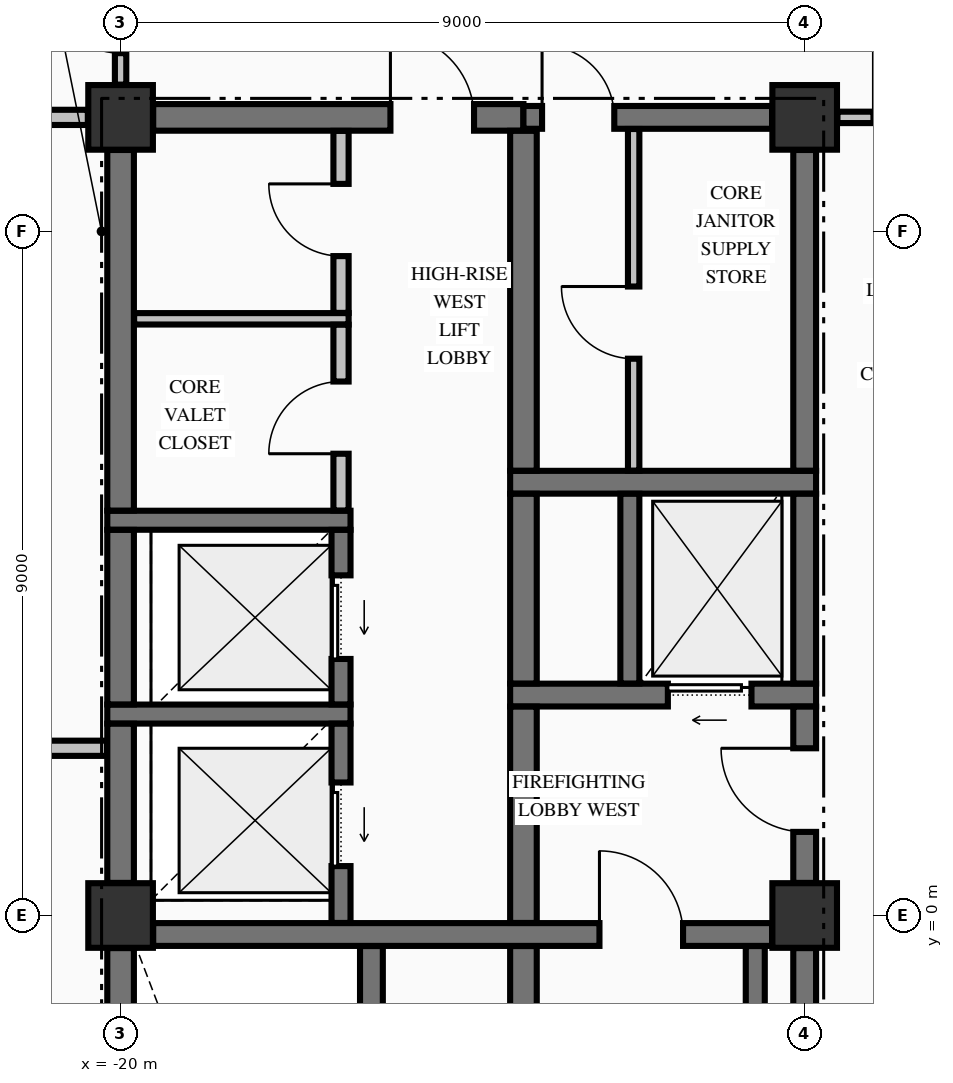
"""IFC4 building model, lengths in metres.
Left out: names, types, materials, properties, quantities, classifications, styles, units other than length and angle.
Written with IfcOpenShell. Run it as: python <this file> out.ifc"""

import sys

from ifc_helpers import new_model, si_unit, direction, frame, frame_2d, origin, origin_2d, place, context, subcontext, project, spatial, rectangle, extrude, element, fill, save


model = new_model("IFC4")
c1 = context("Model", 3, precision=1e-05, world=origin(), true_north=direction((0.0, 1.0)))
c2 = subcontext(c1, "Body", "Model", "MODEL_VIEW")
j1 = project(units=[si_unit("LENGTHUNIT", "METRE"), si_unit("PLANEANGLEUNIT", "RADIAN")], contexts=[c1])
p1 = place(None, origin())
s1 = spatial("IfcSite", under=j1, at=p1, CompositionType="ELEMENT")
p2 = place(p1, origin())
s2 = spatial("IfcBuilding", under=s1, at=p2, CompositionType="ELEMENT")
p3 = place(p2, frame((0.0, 0.0, 211.86)))
s3 = spatial("IfcBuildingStorey", under=s2, at=p3, CompositionType="ELEMENT", Elevation=211.86)
for number, where, z_axis, x_axis in (
    (1, (-20.0, 10.5, -0.325), (0.0, 0.0, 1.0), (1.0, 0.0, 0.0)),
    (2, (-11.0, 0.0, -0.325), (0.0, 0.0, 1.0), (1.0, 0.0, 0.0)),
    (3, (-11.0, 10.5, -0.325), (0.0, 0.0, 1.0), (1.0, 0.0, 0.0)),
    (4, (-20.0, 0.0, -0.325), (0.0, 0.0, 1.0), (1.0, 0.0, 0.0)),
):
    element("IfcColumn", number, at=place(p3, frame(where, z_axis=z_axis, x_axis=x_axis)), inside=s3, PredefinedType="COLUMN", context=c2, shape_type="SweptSolid", body=[
        extrude(rectangle(XDim=0.85, YDim=0.85, at=origin_2d()), origin(), (0.0, 0.0, 1.0), 3.475),
    ])
p4 = place(p3, frame((-19.571, -0.25, 0.0), z_axis=(0.0, 0.0, 1.0), x_axis=(1.0, 0.0, 0.0)))
e5 = element("IfcWall", 5, at=p4, inside=s3, PredefinedType="SHEAR", context=c2, shape_type="SweptSolid", body=[
    extrude(rectangle(XDim=8.142, YDim=0.3, at=frame_2d((4.071, 0.0))), origin(), (0.0, 0.0, 1.0), 3.15),
])
p5 = place(p4, frame((5.871, 0.0, 0.0)))
e6 = element("IfcOpeningElement", 6, at=p5, cuts=e5, PredefinedType="OPENING", context=c2, shape_type="SweptSolid", body=[
    extrude(rectangle(XDim=1.1, YDim=2.15, at=frame_2d((0.55, 1.075))), frame((0.0, 0.16, 0.0), z_axis=(0.0, -1.0, 0.0), x_axis=(1.0, 0.0, 0.0)), (0.0, 0.0, 1.0), 0.32),
])
p6 = place(p3, frame((-20.175, 2.65, 0.0), z_axis=(0.0, 0.0, 1.0), x_axis=(1.0, 0.0, 0.0)))
e7 = element("IfcWall", 7, at=p6, inside=s3, PredefinedType="SOLIDWALL", context=c2, shape_type="SweptSolid", body=[
    extrude(rectangle(XDim=3.2, YDim=0.25, at=frame_2d((1.6, 0.0))), origin(), (0.0, 0.0, 1.0), 3.15),
])
p7 = place(p3, frame((-14.875, 2.9, 0.0), z_axis=(0.0, 0.0, 1.0), x_axis=(1.0, 0.0, 0.0)))
e8 = element("IfcWall", 8, at=p7, inside=s3, PredefinedType="SHEAR", context=c2, shape_type="SweptSolid", body=[
    extrude(rectangle(XDim=4.025, YDim=0.3, at=frame_2d((2.012, 0.0))), origin(), (0.0, 0.0, 1.0), 3.15),
])
p8 = place(p7, frame((2.075, 0.0, 0.0)))
e9 = element("IfcOpeningElement", 9, at=p8, cuts=e8, PredefinedType="OPENING", context=c2, shape_type="SweptSolid", body=[
    extrude(rectangle(XDim=1.1, YDim=2.2, at=frame_2d((0.55, 1.1))), frame((0.0, 0.16, 0.0), z_axis=(0.0, -1.0, 0.0), x_axis=(1.0, 0.0, 0.0)), (0.0, 0.0, 1.0), 0.32),
])
p9 = place(p3, frame((-20.175, 5.2, 0.0), z_axis=(0.0, 0.0, 1.0), x_axis=(1.0, 0.0, 0.0)))
e10 = element("IfcWall", 10, at=p9, inside=s3, PredefinedType="SOLIDWALL", context=c2, shape_type="SweptSolid", body=[
    extrude(rectangle(XDim=3.2, YDim=0.25, at=frame_2d((1.6, 0.0))), origin(), (0.0, 0.0, 1.0), 3.15),
])
p10 = place(p3, frame((-14.875, 5.7, 0.0), z_axis=(0.0, 0.0, 1.0), x_axis=(1.0, 0.0, 0.0)))
e11 = element("IfcWall", 11, at=p10, inside=s3, PredefinedType="SHEAR", context=c2, shape_type="SweptSolid", body=[
    extrude(rectangle(XDim=4.025, YDim=0.3, at=frame_2d((2.012, 0.0))), origin(), (0.0, 0.0, 1.0), 3.15),
])
p11 = place(p3, frame((-19.571, 10.5, 0.0), z_axis=(0.0, 0.0, 1.0), x_axis=(1.0, 0.0, 0.0)))
e12 = element("IfcWall", 12, at=p11, inside=s3, PredefinedType="SHEAR", context=c2, shape_type="SweptSolid", body=[
    extrude(rectangle(XDim=4.871, YDim=0.35, at=frame_2d((2.436, 0.0))), origin(), (0.0, 0.0, 1.0), 3.15),
])
p12 = place(p11, frame((3.121, 0.0, 0.0)))
e13 = element("IfcOpeningElement", 13, at=p12, cuts=e12, PredefinedType="OPENING", context=c2, shape_type="SweptSolid", body=[
    extrude(rectangle(XDim=1.1, YDim=2.15, at=frame_2d((0.55, 1.075))), frame((0.0, 0.185, 0.0), z_axis=(0.0, -1.0, 0.0), x_axis=(1.0, 0.0, 0.0)), (0.0, 0.0, 1.0), 0.37),
])
p13 = place(p3, frame((-14.7, 10.5, 0.0), z_axis=(0.0, 0.0, 1.0), x_axis=(1.0, 0.0, 0.0)))
e14 = element("IfcWall", 14, at=p13, inside=s3, PredefinedType="SHEAR", context=c2, shape_type="SweptSolid", body=[
    extrude(rectangle(XDim=3.271, YDim=0.3, at=frame_2d((1.635, 0.0))), origin(), (0.0, 0.0, 1.0), 3.15),
])
p14 = place(p13, frame((0.245, 0.0, 0.0)))
e15 = element("IfcOpeningElement", 15, at=p14, cuts=e14, PredefinedType="OPENING", context=c2, shape_type="SweptSolid", body=[
    extrude(rectangle(XDim=0.95, YDim=2.15, at=frame_2d((0.475, 1.075))), frame((0.0, 0.16, 0.0), z_axis=(0.0, -1.0, 0.0), x_axis=(1.0, 0.0, 0.0)), (0.0, 0.0, 1.0), 0.32),
])
p15 = place(p3, frame((-26.835, 2.2, 0.0), z_axis=(0.0, 0.0, 1.0), x_axis=(1.0, 0.0, 0.0)))
e16 = element("IfcWall", 16, at=p15, inside=s3, PredefinedType="PARTITIONING", context=c2, shape_type="SweptSolid", body=[
    extrude(rectangle(XDim=6.657, YDim=0.2, at=frame_2d((3.329, 0.0))), origin(), (0.0, 0.0, 1.0), 3.15),
])
p16 = place(p3, frame((-19.822, 7.85, 0.0), z_axis=(0.0, 0.0, 1.0), x_axis=(1.0, 0.0, 0.0)))
e17 = element("IfcWall", 17, at=p16, inside=s3, PredefinedType="PARTITIONING", context=c2, shape_type="SweptSolid", body=[
    extrude(rectangle(XDim=2.822, YDim=0.15, at=frame_2d((1.411, 0.0))), origin(), (0.0, 0.0, 1.0), 3.15),
])
p17 = place(p3, frame((-26.835, 10.5, 0.0), z_axis=(0.0, 0.0, 1.0), x_axis=(1.0, 0.0, 0.0)))
e18 = element("IfcWall", 18, at=p17, inside=s3, PredefinedType="PARTITIONING", context=c2, shape_type="SweptSolid", body=[
    extrude(rectangle(XDim=6.404, YDim=0.2, at=frame_2d((3.202, 0.0))), origin(), (0.0, 0.0, 1.0), 3.15),
])
p18 = place(p17, frame((2.86, 0.0, 0.0)))
e19 = element("IfcOpeningElement", 19, at=p18, cuts=e18, PredefinedType="OPENING", context=c2, shape_type="SweptSolid", body=[
    extrude(rectangle(XDim=0.95, YDim=2.15, at=frame_2d((0.475, 1.075))), frame((0.0, 0.11, 0.0), z_axis=(0.0, -1.0, 0.0), x_axis=(1.0, 0.0, 0.0)), (0.0, 0.0, 1.0), 0.22),
])
p19 = place(p3, frame((-10.569, 10.5, 0.0), z_axis=(0.0, 0.0, 1.0), x_axis=(1.0, 0.0, 0.0)))
e20 = element("IfcWall", 20, at=p19, inside=s3, PredefinedType="PARTITIONING", context=c2, shape_type="SweptSolid", body=[
    extrude(rectangle(XDim=21.138, YDim=0.15, at=frame_2d((10.569, 0.0))), origin(), (0.0, 0.0, 1.0), 3.15),
])
p20 = place(p19, frame((0.474, 0.0, 0.0)))
e21 = element("IfcOpeningElement", 21, at=p20, cuts=e20, PredefinedType="OPENING", context=c2, shape_type="SweptSolid", body=[
    extrude(rectangle(XDim=1.05, YDim=2.15, at=frame_2d((0.525, 1.075))), frame((0.0, 0.085, 0.0), z_axis=(0.0, -1.0, 0.0), x_axis=(1.0, 0.0, 0.0)), (0.0, 0.0, 1.0), 0.17),
])
p21 = place(p19, frame((19.614, 0.0, 0.0)))
e22 = element("IfcOpeningElement", 22, at=p21, cuts=e20, PredefinedType="OPENING", context=c2, shape_type="SweptSolid", body=[
    extrude(rectangle(XDim=1.05, YDim=2.15, at=frame_2d((0.525, 1.075))), frame((0.0, 0.085, 0.0), z_axis=(0.0, -1.0, 0.0), x_axis=(1.0, 0.0, 0.0)), (0.0, 0.0, 1.0), 0.17),
])
p22 = place(p3, frame((-20.0, -9.521, 0.0), z_axis=(0.0, 0.0, 1.0), x_axis=(0.0, 1.0, 0.0)))
e23 = element("IfcWall", 23, at=p22, inside=s3, PredefinedType="SHEAR", context=c2, shape_type="SweptSolid", body=[
    extrude(rectangle(XDim=9.092, YDim=0.35, at=frame_2d((4.546, 0.0))), origin(), (0.0, 0.0, 1.0), 3.15),
])
p23 = place(p3, frame((-20.0, 0.429, 0.0), z_axis=(0.0, 0.0, 1.0), x_axis=(0.0, 1.0, 0.0)))
e24 = element("IfcWall", 24, at=p23, inside=s3, PredefinedType="SHEAR", context=c2, shape_type="SweptSolid", body=[
    extrude(rectangle(XDim=2.094, YDim=0.35, at=frame_2d((1.047, 0.0))), origin(), (0.0, 0.0, 1.0), 3.15),
])
p24 = place(p3, frame((-20.0, 2.777, 0.0), z_axis=(0.0, 0.0, 1.0), x_axis=(0.0, 1.0, 0.0)))
e25 = element("IfcWall", 25, at=p24, inside=s3, PredefinedType="SHEAR", context=c2, shape_type="SweptSolid", body=[
    extrude(rectangle(XDim=2.296, YDim=0.35, at=frame_2d((1.148, 0.0))), origin(), (0.0, 0.0, 1.0), 3.15),
])
p25 = place(p3, frame((-20.0, 5.327, 0.0), z_axis=(0.0, 0.0, 1.0), x_axis=(0.0, 1.0, 0.0)))
e26 = element("IfcWall", 26, at=p25, inside=s3, PredefinedType="SHEAR", context=c2, shape_type="SweptSolid", body=[
    extrude(rectangle(XDim=4.744, YDim=0.35, at=frame_2d((2.372, 0.0))), origin(), (0.0, 0.0, 1.0), 3.15),
])
p26 = place(p3, frame((-17.1, -0.098, 0.0), z_axis=(0.0, 0.0, 1.0), x_axis=(0.0, 1.0, 0.0)))
e27 = element("IfcWall", 27, at=p26, inside=s3, PredefinedType="SOLIDWALL", context=c2, shape_type="SweptSolid", body=[
    extrude(rectangle(XDim=2.621, YDim=0.25, at=frame_2d((1.311, 0.0))), origin(), (0.0, 0.0, 1.0), 3.15),
])
p27 = place(p26, frame((0.748, 0.0, 0.0)))
e28 = element("IfcOpeningElement", 28, at=p27, cuts=e27, PredefinedType="OPENING", context=c2, shape_type="SweptSolid", body=[
    extrude(rectangle(XDim=1.1, YDim=2.2, at=frame_2d((0.55, 1.1))), frame((0.0, 0.135, 0.0), z_axis=(0.0, -1.0, 0.0), x_axis=(1.0, 0.0, 0.0)), (0.0, 0.0, 1.0), 0.27),
])
p28 = place(p3, frame((-17.1, 2.777, 0.0), z_axis=(0.0, 0.0, 1.0), x_axis=(0.0, 1.0, 0.0)))
e29 = element("IfcWall", 29, at=p28, inside=s3, PredefinedType="SOLIDWALL", context=c2, shape_type="SweptSolid", body=[
    extrude(rectangle(XDim=2.296, YDim=0.25, at=frame_2d((1.148, 0.0))), origin(), (0.0, 0.0, 1.0), 3.15),
])
p29 = place(p28, frame((0.598, 0.0, 0.0)))
e30 = element("IfcOpeningElement", 30, at=p29, cuts=e29, PredefinedType="OPENING", context=c2, shape_type="SweptSolid", body=[
    extrude(rectangle(XDim=1.1, YDim=2.2, at=frame_2d((0.55, 1.1))), frame((0.0, 0.135, 0.0), z_axis=(0.0, -1.0, 0.0), x_axis=(1.0, 0.0, 0.0)), (0.0, 0.0, 1.0), 0.27),
])
p30 = place(p3, frame((-16.7, -9.773, 0.0), z_axis=(0.0, 0.0, 1.0), x_axis=(0.0, 1.0, 0.0)))
e31 = element("IfcWall", 31, at=p30, inside=s3, PredefinedType="SHEAR", context=c2, shape_type="SweptSolid", body=[
    extrude(rectangle(XDim=9.371, YDim=0.3, at=frame_2d((4.686, 0.0))), origin(), (0.0, 0.0, 1.0), 3.15),
])
p31 = place(p3, frame((-14.7, -9.773, 0.0), z_axis=(0.0, 0.0, 1.0), x_axis=(0.0, 1.0, 0.0)))
e32 = element("IfcWall", 32, at=p31, inside=s3, PredefinedType="SHEAR", context=c2, shape_type="SweptSolid", body=[
    extrude(rectangle(XDim=9.371, YDim=0.35, at=frame_2d((4.686, 0.0))), origin(), (0.0, 0.0, 1.0), 3.15),
])
p32 = place(p3, frame((-14.7, -0.098, 0.0), z_axis=(0.0, 0.0, 1.0), x_axis=(0.0, 1.0, 0.0)))
e33 = element("IfcWall", 33, at=p32, inside=s3, PredefinedType="SHEAR", context=c2, shape_type="SweptSolid", body=[
    extrude(rectangle(XDim=2.846, YDim=0.35, at=frame_2d((1.423, 0.0))), origin(), (0.0, 0.0, 1.0), 3.15),
])
p33 = place(p3, frame((-14.7, 3.052, 0.0), z_axis=(0.0, 0.0, 1.0), x_axis=(0.0, 1.0, 0.0)))
e34 = element("IfcWall", 34, at=p33, inside=s3, PredefinedType="SHEAR", context=c2, shape_type="SweptSolid", body=[
    extrude(rectangle(XDim=2.496, YDim=0.35, at=frame_2d((1.248, 0.0))), origin(), (0.0, 0.0, 1.0), 3.15),
])
p34 = place(p3, frame((-14.7, 5.852, 0.0), z_axis=(0.0, 0.0, 1.0), x_axis=(0.0, 1.0, 0.0)))
e35 = element("IfcWall", 35, at=p34, inside=s3, PredefinedType="SHEAR", context=c2, shape_type="SweptSolid", body=[
    extrude(rectangle(XDim=4.471, YDim=0.35, at=frame_2d((2.235, 0.0))), origin(), (0.0, 0.0, 1.0), 3.15),
])
p35 = place(p3, frame((-13.3, 3.052, 0.0), z_axis=(0.0, 0.0, 1.0), x_axis=(0.0, 1.0, 0.0)))
e36 = element("IfcWall", 36, at=p35, inside=s3, PredefinedType="SOLIDWALL", context=c2, shape_type="SweptSolid", body=[
    extrude(rectangle(XDim=2.496, YDim=0.25, at=frame_2d((1.248, 0.0))), origin(), (0.0, 0.0, 1.0), 3.15),
])
p36 = place(p3, frame((-11.65, -9.798, 0.0), z_axis=(0.0, 0.0, 1.0), x_axis=(0.0, 1.0, 0.0)))
e37 = element("IfcWall", 37, at=p36, inside=s3, PredefinedType="SOLIDWALL", context=c2, shape_type="SweptSolid", body=[
    extrude(rectangle(XDim=9.396, YDim=0.25, at=frame_2d((4.698, 0.0))), origin(), (0.0, 0.0, 1.0), 3.15),
])
p37 = place(p3, frame((-11.0, -9.521, 0.0), z_axis=(0.0, 0.0, 1.0), x_axis=(0.0, 1.0, 0.0)))
e38 = element("IfcWall", 38, at=p37, inside=s3, PredefinedType="SHEAR", context=c2, shape_type="SweptSolid", body=[
    extrude(rectangle(XDim=9.092, YDim=0.3, at=frame_2d((4.546, 0.0))), origin(), (0.0, 0.0, 1.0), 3.15),
])
p38 = place(p3, frame((-11.0, 0.429, 0.0), z_axis=(0.0, 0.0, 1.0), x_axis=(0.0, 1.0, 0.0)))
e39 = element("IfcWall", 39, at=p38, inside=s3, PredefinedType="SHEAR", context=c2, shape_type="SweptSolid", body=[
    extrude(rectangle(XDim=2.319, YDim=0.3, at=frame_2d((1.16, 0.0))), origin(), (0.0, 0.0, 1.0), 3.15),
])
p39 = place(p38, frame((0.671, 0.0, 0.0)))
e40 = element("IfcOpeningElement", 40, at=p39, cuts=e39, PredefinedType="OPENING", context=c2, shape_type="SweptSolid", body=[
    extrude(rectangle(XDim=1.1, YDim=2.15, at=frame_2d((0.55, 1.075))), frame((0.0, 0.16, 0.0), z_axis=(0.0, -1.0, 0.0), x_axis=(1.0, 0.0, 0.0)), (0.0, 0.0, 1.0), 0.32),
])
p40 = place(p3, frame((-11.0, 3.052, 0.0), z_axis=(0.0, 0.0, 1.0), x_axis=(0.0, 1.0, 0.0)))
e41 = element("IfcWall", 41, at=p40, inside=s3, PredefinedType="SHEAR", context=c2, shape_type="SweptSolid", body=[
    extrude(rectangle(XDim=2.496, YDim=0.3, at=frame_2d((1.248, 0.0))), origin(), (0.0, 0.0, 1.0), 3.15),
])
p41 = place(p3, frame((-11.0, 5.852, 0.0), z_axis=(0.0, 0.0, 1.0), x_axis=(0.0, 1.0, 0.0)))
e42 = element("IfcWall", 42, at=p41, inside=s3, PredefinedType="SHEAR", context=c2, shape_type="SweptSolid", body=[
    extrude(rectangle(XDim=4.219, YDim=0.3, at=frame_2d((2.109, 0.0))), origin(), (0.0, 0.0, 1.0), 3.15),
])
p42 = place(p3, frame((-20.0, 10.931, 0.0), z_axis=(0.0, 0.0, 1.0), x_axis=(0.0, 1.0, 0.0)))
e43 = element("IfcWall", 43, at=p42, inside=s3, PredefinedType="PARTITIONING", context=c2, shape_type="SweptSolid", body=[
    extrude(rectangle(XDim=2.116, YDim=0.15, at=frame_2d((1.058, 0.0))), origin(), (0.0, 0.0, 1.0), 2.342),
])
p43 = place(p42, frame((0.414, 0.0, 0.0)))
e44 = element("IfcOpeningElement", 44, at=p43, cuts=e43, PredefinedType="OPENING", context=c2, shape_type="SweptSolid", body=[
    extrude(rectangle(XDim=0.95, YDim=2.15, at=frame_2d((0.475, 1.075))), frame((0.0, 0.085, 0.0), z_axis=(0.0, -1.0, 0.0), x_axis=(1.0, 0.0, 0.0)), (0.0, 0.0, 1.0), 0.17),
])
p44 = place(p3, frame((-17.1, 5.328, 0.0), z_axis=(0.0, 0.0, 1.0), x_axis=(0.0, 1.0, 0.0)))
e45 = element("IfcWall", 45, at=p44, inside=s3, PredefinedType="PARTITIONING", context=c2, shape_type="SweptSolid", body=[
    extrude(rectangle(XDim=2.444, YDim=0.2, at=frame_2d((1.222, 0.0))), origin(), (0.0, 0.0, 1.0), 3.15),
])
p45 = place(p44, frame((0.747, 0.0, 0.0)))
e46 = element("IfcOpeningElement", 46, at=p45, cuts=e45, PredefinedType="OPENING", context=c2, shape_type="SweptSolid", body=[
    extrude(rectangle(XDim=0.95, YDim=2.15, at=frame_2d((0.475, 1.075))), frame((0.0, 0.11, 0.0), z_axis=(0.0, -1.0, 0.0), x_axis=(1.0, 0.0, 0.0)), (0.0, 0.0, 1.0), 0.22),
])
p46 = place(p3, frame((-17.1, 7.928, 0.0), z_axis=(0.0, 0.0, 1.0), x_axis=(0.0, 1.0, 0.0)))
e47 = element("IfcWall", 47, at=p46, inside=s3, PredefinedType="PARTITIONING", context=c2, shape_type="SweptSolid", body=[
    extrude(rectangle(XDim=2.394, YDim=0.2, at=frame_2d((1.197, 0.0))), origin(), (0.0, 0.0, 1.0), 3.15),
])
p47 = place(p46, frame((0.747, 0.0, 0.0)))
e48 = element("IfcOpeningElement", 48, at=p47, cuts=e47, PredefinedType="OPENING", context=c2, shape_type="SweptSolid", body=[
    extrude(rectangle(XDim=0.95, YDim=2.15, at=frame_2d((0.475, 1.075))), frame((0.0, 0.11, 0.0), z_axis=(0.0, -1.0, 0.0), x_axis=(1.0, 0.0, 0.0)), (0.0, 0.0, 1.0), 0.22),
])
p48 = place(p3, frame((-13.25, 5.853, 0.0), z_axis=(0.0, 0.0, 1.0), x_axis=(0.0, 1.0, 0.0)))
e49 = element("IfcWall", 49, at=p48, inside=s3, PredefinedType="PARTITIONING", context=c2, shape_type="SweptSolid", body=[
    extrude(rectangle(XDim=4.494, YDim=0.15, at=frame_2d((2.247, 0.0))), origin(), (0.0, 0.0, 1.0), 3.15),
])
p49 = place(p48, frame((1.472, 0.0, 0.0)))
e50 = element("IfcOpeningElement", 50, at=p49, cuts=e49, PredefinedType="OPENING", context=c2, shape_type="SweptSolid", body=[
    extrude(rectangle(XDim=0.95, YDim=2.15, at=frame_2d((0.475, 1.075))), frame((0.0, 0.085, 0.0), z_axis=(0.0, -1.0, 0.0), x_axis=(1.0, 0.0, 0.0)), (0.0, 0.0, 1.0), 0.17),
])
p50 = place(p5, origin())
e51 = element("IfcDoor", 51, at=p50, inside=s3, OperationType="SINGLE_SWING_LEFT", PredefinedType="DOOR", context=c2, shape_type="SweptSolid", body=[
    extrude(rectangle(XDim=1.1, YDim=2.15, at=frame_2d((0.55, 1.075))), frame((0.0, 0.025, 0.0), z_axis=(0.0, -1.0, 0.0), x_axis=(1.0, 0.0, 0.0)), (0.0, 0.0, 1.0), 0.05),
])
fill(e6, e51)
p51 = place(p39, origin())
e52 = element("IfcDoor", 52, at=p51, inside=s3, OperationType="SINGLE_SWING_RIGHT", PredefinedType="DOOR", context=c2, shape_type="SweptSolid", body=[
    extrude(rectangle(XDim=1.1, YDim=2.15, at=frame_2d((0.55, 1.075))), frame((0.0, 0.025, 0.0), z_axis=(0.0, -1.0, 0.0), x_axis=(1.0, 0.0, 0.0)), (0.0, 0.0, 1.0), 0.05),
])
fill(e40, e52)
p52 = place(p8, origin())
e53 = element("IfcDoor", 53, at=p52, inside=s3, OperationType="SLIDING_TO_LEFT", PredefinedType="DOOR", context=c2, shape_type="SweptSolid", body=[
    extrude(rectangle(XDim=1.1, YDim=2.2, at=frame_2d((0.55, 1.1))), frame((0.0, 0.025, 0.0), z_axis=(0.0, -1.0, 0.0), x_axis=(1.0, 0.0, 0.0)), (0.0, 0.0, 1.0), 0.05),
])
fill(e9, e53)
p53 = place(p14, origin())
e54 = element("IfcDoor", 54, at=p53, inside=s3, OperationType="SINGLE_SWING_LEFT", PredefinedType="DOOR", context=c2, shape_type="SweptSolid", body=[
    extrude(rectangle(XDim=0.95, YDim=2.15, at=frame_2d((0.475, 1.075))), frame((0.0, 0.025, 0.0), z_axis=(0.0, -1.0, 0.0), x_axis=(1.0, 0.0, 0.0)), (0.0, 0.0, 1.0), 0.05),
])
fill(e15, e54)
p54 = place(p49, origin())
e55 = element("IfcDoor", 55, at=p54, inside=s3, OperationType="SINGLE_SWING_RIGHT", PredefinedType="DOOR", context=c2, shape_type="SweptSolid", body=[
    extrude(rectangle(XDim=0.95, YDim=2.15, at=frame_2d((0.475, 1.075))), frame((0.0, 0.025, 0.0), z_axis=(0.0, -1.0, 0.0), x_axis=(1.0, 0.0, 0.0)), (0.0, 0.0, 1.0), 0.05),
])
fill(e50, e55)
p55 = place(p27, origin())
e56 = element("IfcDoor", 56, at=p55, inside=s3, OperationType="SLIDING_TO_LEFT", PredefinedType="DOOR", context=c2, shape_type="SweptSolid", body=[
    extrude(rectangle(XDim=1.1, YDim=2.2, at=frame_2d((0.55, 1.1))), frame((0.0, 0.025, 0.0), z_axis=(0.0, -1.0, 0.0), x_axis=(1.0, 0.0, 0.0)), (0.0, 0.0, 1.0), 0.05),
])
fill(e28, e56)
p56 = place(p29, origin())
e57 = element("IfcDoor", 57, at=p56, inside=s3, OperationType="SLIDING_TO_LEFT", PredefinedType="DOOR", context=c2, shape_type="SweptSolid", body=[
    extrude(rectangle(XDim=1.1, YDim=2.2, at=frame_2d((0.55, 1.1))), frame((0.0, 0.025, 0.0), z_axis=(0.0, -1.0, 0.0), x_axis=(1.0, 0.0, 0.0)), (0.0, 0.0, 1.0), 0.05),
])
fill(e30, e57)
p57 = place(p12, origin())
e58 = element("IfcDoor", 58, at=p57, inside=s3, OperationType="SINGLE_SWING_LEFT", PredefinedType="DOOR", context=c2, shape_type="SweptSolid", body=[
    extrude(rectangle(XDim=1.1, YDim=2.15, at=frame_2d((0.55, 1.075))), frame((0.0, 0.025, 0.0), z_axis=(0.0, -1.0, 0.0), x_axis=(1.0, 0.0, 0.0)), (0.0, 0.0, 1.0), 0.05),
])
fill(e13, e58)
p58 = place(p47, origin())
e59 = element("IfcDoor", 59, at=p58, inside=s3, OperationType="SINGLE_SWING_RIGHT", PredefinedType="DOOR", context=c2, shape_type="SweptSolid", body=[
    extrude(rectangle(XDim=0.95, YDim=2.15, at=frame_2d((0.475, 1.075))), frame((0.0, 0.025, 0.0), z_axis=(0.0, -1.0, 0.0), x_axis=(1.0, 0.0, 0.0)), (0.0, 0.0, 1.0), 0.05),
])
fill(e48, e59)
p59 = place(p45, origin())
e60 = element("IfcDoor", 60, at=p59, inside=s3, OperationType="SINGLE_SWING_LEFT", PredefinedType="DOOR", context=c2, shape_type="SweptSolid", body=[
    extrude(rectangle(XDim=0.95, YDim=2.15, at=frame_2d((0.475, 1.075))), frame((0.0, 0.025, 0.0), z_axis=(0.0, -1.0, 0.0), x_axis=(1.0, 0.0, 0.0)), (0.0, 0.0, 1.0), 0.05),
])
fill(e46, e60)
p60 = place(p43, origin())
e61 = element("IfcDoor", 61, at=p60, inside=s3, OperationType="SINGLE_SWING_RIGHT", PredefinedType="DOOR", context=c2, shape_type="SweptSolid", body=[
    extrude(rectangle(XDim=0.95, YDim=2.15, at=frame_2d((0.475, 1.075))), frame((0.0, 0.025, 0.0), z_axis=(0.0, -1.0, 0.0), x_axis=(1.0, 0.0, 0.0)), (0.0, 0.0, 1.0), 0.05),
])
fill(e44, e61)
save(model, sys.argv[1])
